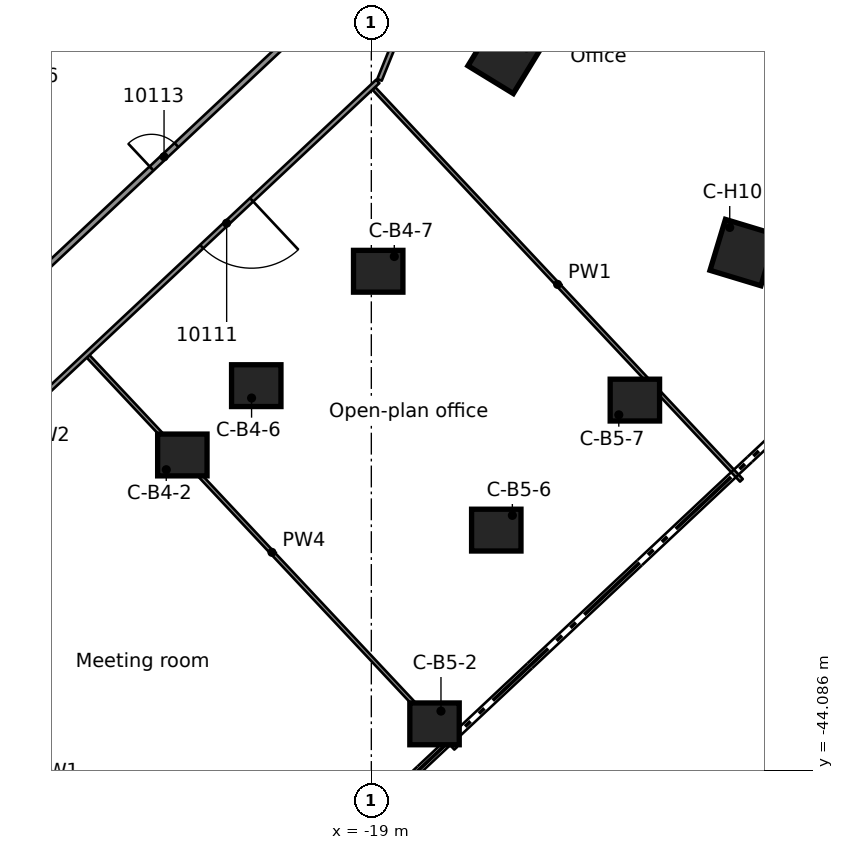
"""IFC4 building model, lengths in metres.
Left out: names, types, materials, properties, quantities, classifications, styles, units other than length and angle.
Written with IfcOpenShell. Run it as: python <this file> out.ifc"""

import sys

from ifc_helpers import new_model, si_unit, direction, frame, frame_2d, origin, origin_2d, place, context, subcontext, project, spatial, rectangle, extrude, element, fill, save


model = new_model("IFC4")
c1 = context("Model", 3, precision=1e-05, world=origin(), true_north=direction((0.0, 1.0)))
c2 = subcontext(c1, "Body", "Model", "MODEL_VIEW")
j1 = project(units=[si_unit("LENGTHUNIT", "METRE"), si_unit("PLANEANGLEUNIT", "RADIAN")], contexts=[c1])
p1 = place(None, origin())
s1 = spatial("IfcSite", under=j1, at=p1, CompositionType="ELEMENT")
p2 = place(p1, origin())
s2 = spatial("IfcBuilding", under=s1, at=p2, CompositionType="ELEMENT")
p3 = place(p2, frame((0.0, 0.0, 51.3)))
s3 = spatial("IfcBuildingStorey", under=s2, at=p3, CompositionType="ELEMENT", Elevation=51.3)
for number, where, z_axis, x_axis in (
    (1, (-23.973, -35.785, 0.0), (0.0, 0.0, 1.0), (1.0, 0.0, 0.0)),
    (2, (-22.028, -33.961, 0.0), (0.0, 0.0, 1.0), (1.0, 0.0, 0.0)),
    (3, (-18.819, -30.951, 0.0), (0.0, 0.0, 1.0), (1.0, 0.0, 0.0)),
    (4, (-17.337, -42.86, 0.0), (0.0, 0.0, 1.0), (1.0, 0.0, 0.0)),
    (5, (-15.712, -37.762, 0.0), (0.0, 0.0, 1.0), (1.0, 0.0, 0.0)),
    (6, (-12.065, -34.341, 0.0), (0.0, 0.0, 1.0), (1.0, 0.0, 0.0)),
):
    element("IfcColumn", number, at=place(p3, frame(where, z_axis=z_axis, x_axis=x_axis)), inside=s3, PredefinedType="COLUMN", context=c2, shape_type="SweptSolid", body=[
        extrude(rectangle(XDim=1.3, YDim=1.1, at=origin_2d()), origin(), (0.0, 0.0, 1.0), 3.5),
    ])
for number, where, z_axis, x_axis in (
    (7, (-9.215, -30.459, 0.0), (0.0, 0.0, 1.0), (-0.29, -0.957, 0.0)),
    (8, (-15.495, -25.313, 0.0), (0.0, 0.0, 1.0), (-0.522, -0.853, 0.0)),
):
    element("IfcColumn", number, at=place(p3, frame(where, z_axis=z_axis, x_axis=x_axis)), inside=s3, PredefinedType="COLUMN", context=c2, shape_type="SweptSolid", body=[
        extrude(rectangle(XDim=1.4, YDim=1.4, at=origin_2d()), origin(), (0.0, 0.0, 1.0), 3.5),
    ])
p4 = place(p3, frame((-32.943, -39.281, 0.0), z_axis=(0.0, 0.0, 1.0), x_axis=(0.684149048077, -0.729342224209, 0.0)))
e9 = element("IfcWall", 9, at=p4, inside=s3, PredefinedType="PARTITIONING", context=c2, shape_type="SweptSolid", body=[
    extrude(rectangle(XDim=14.137, YDim=0.1, at=frame_2d((7.069, 0.0))), origin(), (0.0, 0.0, 1.0), 3.08),
])
p5 = place(p3, frame((-26.451, -33.192, 0.0), z_axis=(0.0, 0.0, 1.0), x_axis=(0.684103113435, -0.729385309825, 0.0)))
e10 = element("IfcWall", 10, at=p5, inside=s3, PredefinedType="PARTITIONING", context=c2, shape_type="SweptSolid", body=[
    extrude(rectangle(XDim=14.137, YDim=0.1, at=frame_2d((7.068, 0.0))), origin(), (0.0, 0.0, 1.0), 2.445),
])
p6 = place(p3, frame((-18.934, -26.141, 0.0), z_axis=(0.0, 0.0, 1.0), x_axis=(0.684157665042, -0.729334141094, 0.0)))
e11 = element("IfcWall", 11, at=p6, inside=s3, PredefinedType="PARTITIONING", context=c2, shape_type="SweptSolid", body=[
    extrude(rectangle(XDim=14.137, YDim=0.1, at=frame_2d((7.069, 0.0))), origin(), (0.0, 0.0, 1.0), 3.08),
])
p7 = place(p3, frame((-18.83, -25.956, 0.0), z_axis=(0.0, 0.0, 1.0), x_axis=(-0.729340205708, -0.684151199909, 0.0)))
e12 = element("IfcWall", 12, at=p7, inside=s3, PredefinedType="PARTITIONING", context=c2, shape_type="SweptSolid", body=[
    extrude(rectangle(XDim=25.009, YDim=0.125, at=frame_2d((12.504, 0.0))), origin(), (0.0, 0.0, 1.0), 3.08),
])
p8 = place(p7, frame((4.553, 0.0, 0.0)))
e13 = element("IfcOpeningElement", 13, at=p8, cuts=e12, PredefinedType="OPENING", context=c2, shape_type="SweptSolid", body=[
    extrude(rectangle(XDim=1.8, YDim=2.1, at=frame_2d((0.9, 1.05))), frame((0.0, 0.073, 0.0), z_axis=(0.0, -1.0, 0.0), x_axis=(1.0, 0.0, 0.0)), (0.0, 0.0, 1.0), 0.145),
])
p9 = place(p7, frame((14.609, 0.0, 0.0)))
e14 = element("IfcOpeningElement", 14, at=p9, cuts=e12, PredefinedType="OPENING", context=c2, shape_type="SweptSolid", body=[
    extrude(rectangle(XDim=0.9, YDim=2.1, at=frame_2d((0.45, 1.05))), frame((0.0, 0.073, 0.0), z_axis=(0.0, -1.0, 0.0), x_axis=(1.0, 0.0, 0.0)), (0.0, 0.0, 1.0), 0.145),
])
p10 = place(p7, frame((21.26, 0.0, 0.0)))
e15 = element("IfcOpeningElement", 15, at=p10, cuts=e12, PredefinedType="OPENING", context=c2, shape_type="SweptSolid", body=[
    extrude(rectangle(XDim=1.8, YDim=2.1, at=frame_2d((0.9, 1.05))), frame((0.0, 0.073, 0.0), z_axis=(0.0, -1.0, 0.0), x_axis=(1.0, 0.0, 0.0)), (0.0, 0.0, 1.0), 0.145),
])
p11 = place(p3, frame((-36.743, -39.467, 0.0), z_axis=(0.0, 0.0, 1.0), x_axis=(0.729324503449, 0.684167938936, 0.0)))
e16 = element("IfcWall", 16, at=p11, inside=s3, PredefinedType="PARTITIONING", context=c2, shape_type="SweptSolid", body=[
    extrude(rectangle(XDim=21.767, YDim=0.15, at=frame_2d((10.883, 0.0))), origin(), (0.0, 0.0, 1.0), 3.08),
])
p12 = place(p11, frame((16.399, 0.0, 0.0)))
e17 = element("IfcOpeningElement", 17, at=p12, cuts=e16, PredefinedType="OPENING", context=c2, shape_type="SweptSolid", body=[
    extrude(rectangle(XDim=0.9, YDim=2.1, at=frame_2d((0.45, 1.05))), frame((0.0, 0.085, 0.0), z_axis=(0.0, -1.0, 0.0), x_axis=(1.0, 0.0, 0.0)), (0.0, 0.0, 1.0), 0.17),
])
p13 = place(p3, frame((-25.654, -19.058, 0.0), z_axis=(0.0, 0.0, 1.0), x_axis=(-0.729332765971, -0.684159130964, 0.0)))
e18 = element("IfcWall", 18, at=p13, inside=s3, PredefinedType="PARTITIONING", context=c2, shape_type="SweptSolid", body=[
    extrude(rectangle(XDim=22.05, YDim=0.15, at=frame_2d((11.025, 0.0))), origin(), (0.0, 0.0, 1.0), 3.08),
])
p14 = place(p13, frame((14.351, 0.0, 0.0)))
e19 = element("IfcOpeningElement", 19, at=p14, cuts=e18, PredefinedType="OPENING", context=c2, shape_type="SweptSolid", body=[
    extrude(rectangle(XDim=0.9, YDim=2.1, at=frame_2d((0.45, 1.05))), frame((0.0, 0.085, 0.0), z_axis=(0.0, -1.0, 0.0), x_axis=(1.0, 0.0, 0.0)), (0.0, 0.0, 1.0), 0.17),
])
p15 = place(p3, frame((-45.13, -34.035, 0.0), z_axis=(0.0, 0.0, 1.0), x_axis=(0.729450212829, 0.684033907788, 0.0)))
e20 = element("IfcWall", 20, at=p15, inside=s3, PredefinedType="PARTITIONING", context=c2, shape_type="SweptSolid", body=[
    extrude(rectangle(XDim=24.507, YDim=0.125, at=frame_2d((12.254, 0.0))), origin(), (0.0, 0.0, 1.0), 3.08),
])
p16 = place(p15, frame((18.55, 0.0, 0.0)))
e21 = element("IfcOpeningElement", 21, at=p16, cuts=e20, PredefinedType="OPENING", context=c2, shape_type="SweptSolid", body=[
    extrude(rectangle(XDim=1.8, YDim=2.1, at=frame_2d((0.9, 1.05))), frame((0.0, 0.073, 0.0), z_axis=(0.0, -1.0, 0.0), x_axis=(1.0, 0.0, 0.0)), (0.0, 0.0, 1.0), 0.145),
])
p17 = place(p15, frame((8.9, 0.0, 0.0)))
e22 = element("IfcOpeningElement", 22, at=p17, cuts=e20, PredefinedType="OPENING", context=c2, shape_type="SweptSolid", body=[
    extrude(rectangle(XDim=1.8, YDim=2.1, at=frame_2d((0.9, 1.05))), frame((0.0, 0.073, 0.0), z_axis=(0.0, -1.0, 0.0), x_axis=(1.0, 0.0, 0.0)), (0.0, 0.0, 1.0), 0.145),
])
p18 = place(p3, frame((-18.784, -25.914, 0.0), z_axis=(0.0, 0.0, 1.0), x_axis=(0.374700754386, 0.927145805504, 0.0)))
e23 = element("IfcWall", 23, at=p18, inside=s3, PredefinedType="PARTITIONING", context=c2, shape_type="SweptSolid", body=[
    extrude(rectangle(XDim=5.757, YDim=0.125, at=frame_2d((2.878, 0.0))), origin(), (0.0, 0.0, 1.0), 3.08),
])
p19 = place(p8, origin())
e24 = element("IfcDoor", 24, at=p19, inside=s3, OperationType="DOUBLE_DOOR_SINGLE_SWING", PredefinedType="DOOR", context=c2, shape_type="SweptSolid", body=[
    extrude(rectangle(XDim=1.8, YDim=2.1, at=frame_2d((0.9, 1.05))), frame((0.0, 0.025, 0.0), z_axis=(0.0, -1.0, 0.0), x_axis=(1.0, 0.0, 0.0)), (0.0, 0.0, 1.0), 0.05),
])
fill(e13, e24)
p20 = place(p12, origin())
e25 = element("IfcDoor", 25, at=p20, inside=s3, OperationType="SINGLE_SWING_RIGHT", PredefinedType="DOOR", context=c2, shape_type="SweptSolid", body=[
    extrude(rectangle(XDim=0.9, YDim=2.1, at=frame_2d((0.45, 1.05))), frame((0.0, 0.025, 0.0), z_axis=(0.0, -1.0, 0.0), x_axis=(1.0, 0.0, 0.0)), (0.0, 0.0, 1.0), 0.05),
])
fill(e17, e25)
save(model, sys.argv[1])
